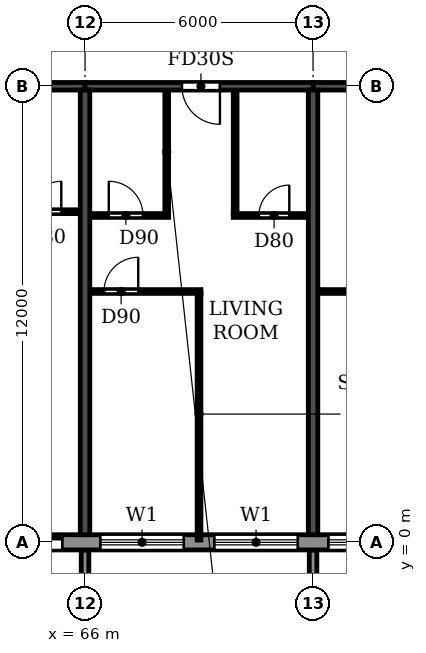
"""IFC4 building model, lengths in metres.
Left out: names, types, materials, properties, quantities, classifications, styles, units other than length and angle.
Written with IfcOpenShell. Run it as: python <this file> out.ifc"""

import sys

from ifc_helpers import new_model, si_unit, direction, frame, frame_2d, origin, place, context, subcontext, project, spatial, polyline, rectangle, outline, extrude, source, transform, mapped, element, fill, save


model = new_model("IFC4")
c1 = context("Model", 3, precision=1e-05, world=origin(), true_north=direction((0.0, 1.0)))
c2 = subcontext(c1, "Body", "Model", "MODEL_VIEW")
j1 = project(units=[si_unit("LENGTHUNIT", "METRE"), si_unit("PLANEANGLEUNIT", "RADIAN")], contexts=[c1])
p1 = place(None, origin())
s1 = spatial("IfcSite", under=j1, at=p1, CompositionType="ELEMENT")
p2 = place(p1, origin())
s2 = spatial("IfcBuilding", under=s1, at=p2, CompositionType="ELEMENT")
p3 = place(p2, frame((0.0, 0.0, 257.7)))
s3 = spatial("IfcBuildingStorey", under=s2, at=p3, CompositionType="ELEMENT", Elevation=257.7)
for number, where, z_axis, x_axis in (
    (1, (66.0, 0.2, 0.0), (0.0, 0.0, 1.0), (0.0, 1.0, 0.0)),
    (2, (72.0, 0.2, 0.0), (0.0, 0.0, 1.0), (0.0, 1.0, 0.0)),
):
    element("IfcWall", number, at=place(p3, frame(where, z_axis=z_axis, x_axis=x_axis)), inside=s3, PredefinedType="SHEAR", context=c2, shape_type="SweptSolid", body=[
        extrude(rectangle(XDim=11.7, YDim=0.25, at=frame_2d((5.85, 0.0))), origin(), (0.0, 0.0, 1.0), 3.0),
    ])
p4 = place(p3, frame((60.0, 12.0, 0.0), z_axis=(0.0, 0.0, 1.0), x_axis=(1.0, 0.0, 0.0)))
e3 = element("IfcWall", 3, at=p4, inside=s3, PredefinedType="SHEAR", context=c2, shape_type="SweptSolid", body=[
    extrude(rectangle(XDim=6.0, YDim=0.2, at=frame_2d((3.0, 0.0))), origin(), (0.0, 0.0, 1.0), 2.4),
])
p5 = place(p4, frame((2.55, 0.0, 0.0)))
e4 = element("IfcOpeningElement", 4, at=p5, cuts=e3, PredefinedType="OPENING", context=c2, shape_type="SweptSolid", body=[
    extrude(rectangle(XDim=1.0, YDim=2.1, at=frame_2d((0.5, 1.05))), frame((0.0, 0.11, 0.0), z_axis=(0.0, -1.0, 0.0), x_axis=(1.0, 0.0, 0.0)), (0.0, 0.0, 1.0), 0.22),
])
p6 = place(p3, frame((66.0, 12.0, 0.0), z_axis=(0.0, 0.0, 1.0), x_axis=(1.0, 0.0, 0.0)))
e5 = element("IfcWall", 5, at=p6, inside=s3, PredefinedType="SHEAR", context=c2, shape_type="SweptSolid", body=[
    extrude(rectangle(XDim=6.0, YDim=0.2, at=frame_2d((3.0, 0.0))), origin(), (0.0, 0.0, 1.0), 2.4),
])
p7 = place(p6, frame((2.55, 0.0, 0.0)))
e6 = element("IfcOpeningElement", 6, at=p7, cuts=e5, PredefinedType="OPENING", context=c2, shape_type="SweptSolid", body=[
    extrude(rectangle(XDim=1.0, YDim=2.1, at=frame_2d((0.5, 1.05))), frame((0.0, 0.11, 0.0), z_axis=(0.0, -1.0, 0.0), x_axis=(1.0, 0.0, 0.0)), (0.0, 0.0, 1.0), 0.22),
])
p8 = place(p3, frame((72.0, 12.0, 0.0), z_axis=(0.0, 0.0, 1.0), x_axis=(1.0, 0.0, 0.0)))
e7 = element("IfcWall", 7, at=p8, inside=s3, PredefinedType="SHEAR", context=c2, shape_type="SweptSolid", body=[
    extrude(rectangle(XDim=6.0, YDim=0.2, at=frame_2d((3.0, 0.0))), origin(), (0.0, 0.0, 1.0), 2.4),
])
p9 = place(p8, frame((2.45, 0.0, 0.0)))
e8 = element("IfcOpeningElement", 8, at=p9, cuts=e7, PredefinedType="OPENING", context=c2, shape_type="SweptSolid", body=[
    extrude(rectangle(XDim=1.0, YDim=2.1, at=frame_2d((0.5, 1.05))), frame((0.0, 0.11, 0.0), z_axis=(0.0, -1.0, 0.0), x_axis=(1.0, 0.0, 0.0)), (0.0, 0.0, 1.0), 0.22),
])
p10 = place(p3, frame((22.683, 0.0, 0.0), z_axis=(0.0, 0.0, 1.0), x_axis=(1.0, 0.0, 0.0)))
e9 = element("IfcWall", 9, at=p10, inside=s3, PredefinedType="STANDARD", context=c2, shape_type="SweptSolid", body=[
    extrude(rectangle(XDim=56.634, YDim=0.4, at=frame_2d((28.317, 0.0))), origin(), (0.0, 0.0, 1.0), 3.0),
])
p11 = place(p10, frame((1.717, 0.0, 0.9)))
e10 = element("IfcOpeningElement", 10, at=p11, cuts=e9, PredefinedType="OPENING", context=c2, shape_type="SweptSolid", body=[
    extrude(rectangle(XDim=2.2, YDim=1.5, at=frame_2d((1.1, 0.75))), frame((0.0, 0.21, 0.0), z_axis=(0.0, -1.0, 0.0), x_axis=(1.0, 0.0, 0.0)), (0.0, 0.0, 1.0), 0.42),
])
p12 = place(p10, frame((4.917, 0.0, 0.0)))
e11 = element("IfcOpeningElement", 11, at=p12, cuts=e9, PredefinedType="OPENING", context=c2, shape_type="SweptSolid", body=[
    extrude(rectangle(XDim=1.8, YDim=2.4, at=frame_2d((0.9, 1.2))), frame((0.0, 0.21, 0.0), z_axis=(0.0, -1.0, 0.0), x_axis=(1.0, 0.0, 0.0)), (0.0, 0.0, 1.0), 0.42),
])
p13 = place(p10, frame((7.717, 0.0, 0.9)))
e12 = element("IfcOpeningElement", 12, at=p13, cuts=e9, PredefinedType="OPENING", context=c2, shape_type="SweptSolid", body=[
    extrude(rectangle(XDim=2.2, YDim=1.5, at=frame_2d((1.1, 0.75))), frame((0.0, 0.21, 0.0), z_axis=(0.0, -1.0, 0.0), x_axis=(1.0, 0.0, 0.0)), (0.0, 0.0, 1.0), 0.42),
])
p14 = place(p10, frame((10.717, 0.0, 0.9)))
e13 = element("IfcOpeningElement", 13, at=p14, cuts=e9, PredefinedType="OPENING", context=c2, shape_type="SweptSolid", body=[
    extrude(rectangle(XDim=2.2, YDim=1.5, at=frame_2d((1.1, 0.75))), frame((0.0, 0.21, 0.0), z_axis=(0.0, -1.0, 0.0), x_axis=(1.0, 0.0, 0.0)), (0.0, 0.0, 1.0), 0.42),
])
p15 = place(p10, frame((13.717, 0.0, 0.9)))
e14 = element("IfcOpeningElement", 14, at=p15, cuts=e9, PredefinedType="OPENING", context=c2, shape_type="SweptSolid", body=[
    extrude(rectangle(XDim=2.2, YDim=1.5, at=frame_2d((1.1, 0.75))), frame((0.0, 0.21, 0.0), z_axis=(0.0, -1.0, 0.0), x_axis=(1.0, 0.0, 0.0)), (0.0, 0.0, 1.0), 0.42),
])
p16 = place(p10, frame((16.917, 0.0, 0.0)))
e15 = element("IfcOpeningElement", 15, at=p16, cuts=e9, PredefinedType="OPENING", context=c2, shape_type="SweptSolid", body=[
    extrude(rectangle(XDim=1.8, YDim=2.4, at=frame_2d((0.9, 1.2))), frame((0.0, 0.21, 0.0), z_axis=(0.0, -1.0, 0.0), x_axis=(1.0, 0.0, 0.0)), (0.0, 0.0, 1.0), 0.42),
])
p17 = place(p10, frame((19.717, 0.0, 0.9)))
e16 = element("IfcOpeningElement", 16, at=p17, cuts=e9, PredefinedType="OPENING", context=c2, shape_type="SweptSolid", body=[
    extrude(rectangle(XDim=2.2, YDim=1.5, at=frame_2d((1.1, 0.75))), frame((0.0, 0.21, 0.0), z_axis=(0.0, -1.0, 0.0), x_axis=(1.0, 0.0, 0.0)), (0.0, 0.0, 1.0), 0.42),
])
p18 = place(p10, frame((22.717, 0.0, 0.9)))
e17 = element("IfcOpeningElement", 17, at=p18, cuts=e9, PredefinedType="OPENING", context=c2, shape_type="SweptSolid", body=[
    extrude(rectangle(XDim=2.2, YDim=1.5, at=frame_2d((1.1, 0.75))), frame((0.0, 0.21, 0.0), z_axis=(0.0, -1.0, 0.0), x_axis=(1.0, 0.0, 0.0)), (0.0, 0.0, 1.0), 0.42),
])
p19 = place(p10, frame((25.717, 0.0, 0.9)))
e18 = element("IfcOpeningElement", 18, at=p19, cuts=e9, PredefinedType="OPENING", context=c2, shape_type="SweptSolid", body=[
    extrude(rectangle(XDim=2.2, YDim=1.5, at=frame_2d((1.1, 0.75))), frame((0.0, 0.21, 0.0), z_axis=(0.0, -1.0, 0.0), x_axis=(1.0, 0.0, 0.0)), (0.0, 0.0, 1.0), 0.42),
])
p20 = place(p10, frame((28.917, 0.0, 0.0)))
e19 = element("IfcOpeningElement", 19, at=p20, cuts=e9, PredefinedType="OPENING", context=c2, shape_type="SweptSolid", body=[
    extrude(rectangle(XDim=1.8, YDim=2.4, at=frame_2d((0.9, 1.2))), frame((0.0, 0.21, 0.0), z_axis=(0.0, -1.0, 0.0), x_axis=(1.0, 0.0, 0.0)), (0.0, 0.0, 1.0), 0.42),
])
p21 = place(p10, frame((31.717, 0.0, 0.9)))
e20 = element("IfcOpeningElement", 20, at=p21, cuts=e9, PredefinedType="OPENING", context=c2, shape_type="SweptSolid", body=[
    extrude(rectangle(XDim=2.2, YDim=1.5, at=frame_2d((1.1, 0.75))), frame((0.0, 0.21, 0.0), z_axis=(0.0, -1.0, 0.0), x_axis=(1.0, 0.0, 0.0)), (0.0, 0.0, 1.0), 0.42),
])
p22 = place(p10, frame((34.717, 0.0, 0.9)))
e21 = element("IfcOpeningElement", 21, at=p22, cuts=e9, PredefinedType="OPENING", context=c2, shape_type="SweptSolid", body=[
    extrude(rectangle(XDim=2.2, YDim=1.5, at=frame_2d((1.1, 0.75))), frame((0.0, 0.21, 0.0), z_axis=(0.0, -1.0, 0.0), x_axis=(1.0, 0.0, 0.0)), (0.0, 0.0, 1.0), 0.42),
])
p23 = place(p10, frame((37.717, 0.0, 0.9)))
e22 = element("IfcOpeningElement", 22, at=p23, cuts=e9, PredefinedType="OPENING", context=c2, shape_type="SweptSolid", body=[
    extrude(rectangle(XDim=2.2, YDim=1.5, at=frame_2d((1.1, 0.75))), frame((0.0, 0.21, 0.0), z_axis=(0.0, -1.0, 0.0), x_axis=(1.0, 0.0, 0.0)), (0.0, 0.0, 1.0), 0.42),
])
p24 = place(p10, frame((40.917, 0.0, 0.0)))
e23 = element("IfcOpeningElement", 23, at=p24, cuts=e9, PredefinedType="OPENING", context=c2, shape_type="SweptSolid", body=[
    extrude(rectangle(XDim=1.8, YDim=2.4, at=frame_2d((0.9, 1.2))), frame((0.0, 0.21, 0.0), z_axis=(0.0, -1.0, 0.0), x_axis=(1.0, 0.0, 0.0)), (0.0, 0.0, 1.0), 0.42),
])
p25 = place(p10, frame((43.717, 0.0, 0.9)))
e24 = element("IfcOpeningElement", 24, at=p25, cuts=e9, PredefinedType="OPENING", context=c2, shape_type="SweptSolid", body=[
    extrude(rectangle(XDim=2.2, YDim=1.5, at=frame_2d((1.1, 0.75))), frame((0.0, 0.21, 0.0), z_axis=(0.0, -1.0, 0.0), x_axis=(1.0, 0.0, 0.0)), (0.0, 0.0, 1.0), 0.42),
])
p26 = place(p10, frame((46.717, 0.0, 0.9)))
e25 = element("IfcOpeningElement", 25, at=p26, cuts=e9, PredefinedType="OPENING", context=c2, shape_type="SweptSolid", body=[
    extrude(rectangle(XDim=2.2, YDim=1.5, at=frame_2d((1.1, 0.75))), frame((0.0, 0.21, 0.0), z_axis=(0.0, -1.0, 0.0), x_axis=(1.0, 0.0, 0.0)), (0.0, 0.0, 1.0), 0.42),
])
p27 = place(p10, frame((49.717, 0.0, 0.9)))
e26 = element("IfcOpeningElement", 26, at=p27, cuts=e9, PredefinedType="OPENING", context=c2, shape_type="SweptSolid", body=[
    extrude(rectangle(XDim=2.2, YDim=1.5, at=frame_2d((1.1, 0.75))), frame((0.0, 0.21, 0.0), z_axis=(0.0, -1.0, 0.0), x_axis=(1.0, 0.0, 0.0)), (0.0, 0.0, 1.0), 0.42),
])
p28 = place(p10, frame((52.917, 0.0, 0.0)))
e27 = element("IfcOpeningElement", 27, at=p28, cuts=e9, PredefinedType="OPENING", context=c2, shape_type="SweptSolid", body=[
    extrude(rectangle(XDim=1.8, YDim=2.4, at=frame_2d((0.9, 1.2))), frame((0.0, 0.21, 0.0), z_axis=(0.0, -1.0, 0.0), x_axis=(1.0, 0.0, 0.0)), (0.0, 0.0, 1.0), 0.42),
])
m1 = source(origin(), c2, "Body", "SweptSolid", [
    extrude(outline(polyline([(0.0, 0.0), (0.2, 0.0), (0.2, 1.65), (0.0, 1.65), (0.0, 0.0)])), origin(), (0.0, 0.0, 1.0), 3.1),
])
for number, where in (
    (28, (65.9, -1.85, 0.0)),
    (29, (71.9, -1.85, 0.0)),
):
    element("IfcWall", number, at=place(p3, frame(where)), inside=s3, PredefinedType="STANDARD", context=c2, shape_type="MappedRepresentation", body=[
        mapped(m1, transform((0.0, 0.0, 0.0))),
    ])
p29 = place(p3, frame((66.135, 6.6, 0.0), z_axis=(0.0, 0.0, 1.0), x_axis=(1.0, 0.0, 0.0)))
e30 = element("IfcWall", 30, at=p29, inside=s3, PredefinedType="PARTITIONING", context=c2, shape_type="SweptSolid", body=[
    extrude(rectangle(XDim=2.915, YDim=0.1, at=frame_2d((1.458, 0.0))), origin(), (0.0, 0.0, 1.0), 3.0),
])
p30 = place(p29, frame((0.365, 0.0, 0.0)))
e31 = element("IfcOpeningElement", 31, at=p30, cuts=e30, PredefinedType="OPENING", context=c2, shape_type="SweptSolid", body=[
    extrude(rectangle(XDim=0.9, YDim=2.1, at=frame_2d((0.45, 1.05))), frame((0.0, 0.06, 0.0), z_axis=(0.0, -1.0, 0.0), x_axis=(1.0, 0.0, 0.0)), (0.0, 0.0, 1.0), 0.12),
])
p31 = place(p3, frame((72.135, 6.6, 0.0), z_axis=(0.0, 0.0, 1.0), x_axis=(1.0, 0.0, 0.0)))
e32 = element("IfcWall", 32, at=p31, inside=s3, PredefinedType="PARTITIONING", context=c2, shape_type="SweptSolid", body=[
    extrude(rectangle(XDim=1.965, YDim=0.1, at=frame_2d((0.982, 0.0))), origin(), (0.0, 0.0, 1.0), 3.0),
])
p32 = place(p3, frame((66.135, 8.6, 0.0), z_axis=(0.0, 0.0, 1.0), x_axis=(1.0, 0.0, 0.0)))
e33 = element("IfcWall", 33, at=p32, inside=s3, PredefinedType="PARTITIONING", context=c2, shape_type="SweptSolid", body=[
    extrude(rectangle(XDim=2.065, YDim=0.1, at=frame_2d((1.032, 0.0))), origin(), (0.0, 0.0, 1.0), 3.0),
])
p33 = place(p32, frame((0.49, 0.0, 0.0)))
e34 = element("IfcOpeningElement", 34, at=p33, cuts=e33, PredefinedType="OPENING", context=c2, shape_type="SweptSolid", body=[
    extrude(rectangle(XDim=0.9, YDim=2.1, at=frame_2d((0.45, 1.05))), frame((0.0, 0.06, 0.0), z_axis=(0.0, -1.0, 0.0), x_axis=(1.0, 0.0, 0.0)), (0.0, 0.0, 1.0), 0.12),
])
p34 = place(p3, frame((69.9, 8.6, 0.0), z_axis=(0.0, 0.0, 1.0), x_axis=(1.0, 0.0, 0.0)))
e35 = element("IfcWall", 35, at=p34, inside=s3, PredefinedType="PARTITIONING", context=c2, shape_type="SweptSolid", body=[
    extrude(rectangle(XDim=1.965, YDim=0.1, at=frame_2d((0.982, 0.0))), origin(), (0.0, 0.0, 1.0), 3.0),
])
p35 = place(p34, frame((0.675, 0.0, 0.0)))
e36 = element("IfcOpeningElement", 36, at=p35, cuts=e35, PredefinedType="OPENING", context=c2, shape_type="SweptSolid", body=[
    extrude(rectangle(XDim=0.8, YDim=2.1, at=frame_2d((0.4, 1.05))), frame((0.0, 0.06, 0.0), z_axis=(0.0, -1.0, 0.0), x_axis=(1.0, 0.0, 0.0)), (0.0, 0.0, 1.0), 0.12),
])
p36 = place(p3, frame((63.9, 8.7, 0.0), z_axis=(0.0, 0.0, 1.0), x_axis=(1.0, 0.0, 0.0)))
e37 = element("IfcWall", 37, at=p36, inside=s3, PredefinedType="PARTITIONING", context=c2, shape_type="SweptSolid", body=[
    extrude(rectangle(XDim=1.965, YDim=0.1, at=frame_2d((0.982, 0.0))), origin(), (0.0, 0.0, 1.0), 3.0),
])
p37 = place(p36, frame((0.675, 0.0, 0.0)))
e38 = element("IfcOpeningElement", 38, at=p37, cuts=e37, PredefinedType="OPENING", context=c2, shape_type="SweptSolid", body=[
    extrude(rectangle(XDim=0.8, YDim=2.1, at=frame_2d((0.4, 1.05))), frame((0.0, 0.06, 0.0), z_axis=(0.0, -1.0, 0.0), x_axis=(1.0, 0.0, 0.0)), (0.0, 0.0, 1.0), 0.12),
])
p38 = place(p3, frame((68.15, 8.65, 0.0), z_axis=(0.0, 0.0, 1.0), x_axis=(0.0, 1.0, 0.0)))
e39 = element("IfcWall", 39, at=p38, inside=s3, PredefinedType="PARTITIONING", context=c2, shape_type="SweptSolid", body=[
    extrude(rectangle(XDim=3.24, YDim=0.1, at=frame_2d((1.62, 0.0))), origin(), (0.0, 0.0, 1.0), 3.0),
])
p39 = place(p3, frame((69.0, 0.06, 0.0), z_axis=(0.0, 0.0, 1.0), x_axis=(0.0, 1.0, 0.0)))
e40 = element("IfcWall", 40, at=p39, inside=s3, PredefinedType="PARTITIONING", context=c2, shape_type="SweptSolid", body=[
    extrude(rectangle(XDim=6.49, YDim=0.1, at=frame_2d((3.245, 0.0))), origin(), (0.0, 0.0, 1.0), 3.0),
])
p40 = place(p3, frame((69.95, 8.65, 0.0), z_axis=(0.0, 0.0, 1.0), x_axis=(0.0, 1.0, 0.0)))
e41 = element("IfcWall", 41, at=p40, inside=s3, PredefinedType="PARTITIONING", context=c2, shape_type="SweptSolid", body=[
    extrude(rectangle(XDim=3.24, YDim=0.1, at=frame_2d((1.62, 0.0))), origin(), (0.0, 0.0, 1.0), 3.0),
])
p41 = place(p24, origin())
e42 = element("IfcDoor", 42, at=p41, inside=s3, OperationType="DOUBLE_DOOR_SLIDING", PredefinedType="DOOR", context=c2, shape_type="SweptSolid", body=[
    extrude(rectangle(XDim=1.8, YDim=2.4, at=frame_2d((0.9, 1.2))), frame((0.0, 0.025, 0.0), z_axis=(0.0, -1.0, 0.0), x_axis=(1.0, 0.0, 0.0)), (0.0, 0.0, 1.0), 0.05),
])
fill(e23, e42)
p42 = place(p25, origin())
e43 = element("IfcWindow", 43, at=p42, inside=s3, PartitioningType="DOUBLE_PANEL_HORIZONTAL", PredefinedType="WINDOW", context=c2, shape_type="SweptSolid", body=[
    extrude(rectangle(XDim=2.2, YDim=1.5, at=frame_2d((1.1, 0.75))), frame((0.0, 0.03, 0.0), z_axis=(0.0, -1.0, 0.0), x_axis=(1.0, 0.0, 0.0)), (0.0, 0.0, 1.0), 0.06),
])
fill(e24, e43)
p43 = place(p26, origin())
e44 = element("IfcWindow", 44, at=p43, inside=s3, PartitioningType="DOUBLE_PANEL_HORIZONTAL", PredefinedType="WINDOW", context=c2, shape_type="SweptSolid", body=[
    extrude(rectangle(XDim=2.2, YDim=1.5, at=frame_2d((1.1, 0.75))), frame((0.0, 0.03, 0.0), z_axis=(0.0, -1.0, 0.0), x_axis=(1.0, 0.0, 0.0)), (0.0, 0.0, 1.0), 0.06),
])
fill(e25, e44)
p44 = place(p27, origin())
e45 = element("IfcWindow", 45, at=p44, inside=s3, PartitioningType="DOUBLE_PANEL_HORIZONTAL", PredefinedType="WINDOW", context=c2, shape_type="SweptSolid", body=[
    extrude(rectangle(XDim=2.2, YDim=1.5, at=frame_2d((1.1, 0.75))), frame((0.0, 0.03, 0.0), z_axis=(0.0, -1.0, 0.0), x_axis=(1.0, 0.0, 0.0)), (0.0, 0.0, 1.0), 0.06),
])
fill(e26, e45)
p45 = place(p37, origin())
e46 = element("IfcDoor", 46, at=p45, inside=s3, OperationType="SINGLE_SWING_RIGHT", PredefinedType="DOOR", context=c2, shape_type="SweptSolid", body=[
    extrude(rectangle(XDim=0.8, YDim=2.1, at=frame_2d((0.4, 1.05))), frame((0.0, 0.025, 0.0), z_axis=(0.0, -1.0, 0.0), x_axis=(1.0, 0.0, 0.0)), (0.0, 0.0, 1.0), 0.05),
])
fill(e38, e46)
p46 = place(p30, origin())
e47 = element("IfcDoor", 47, at=p46, inside=s3, OperationType="SINGLE_SWING_RIGHT", PredefinedType="DOOR", context=c2, shape_type="SweptSolid", body=[
    extrude(rectangle(XDim=0.9, YDim=2.1, at=frame_2d((0.45, 1.05))), frame((0.0, 0.025, 0.0), z_axis=(0.0, -1.0, 0.0), x_axis=(1.0, 0.0, 0.0)), (0.0, 0.0, 1.0), 0.05),
])
fill(e31, e47)
p47 = place(p33, origin())
e48 = element("IfcDoor", 48, at=p47, inside=s3, OperationType="SINGLE_SWING_LEFT", PredefinedType="DOOR", context=c2, shape_type="SweptSolid", body=[
    extrude(rectangle(XDim=0.9, YDim=2.1, at=frame_2d((0.45, 1.05))), frame((0.0, 0.025, 0.0), z_axis=(0.0, -1.0, 0.0), x_axis=(1.0, 0.0, 0.0)), (0.0, 0.0, 1.0), 0.05),
])
fill(e34, e48)
p48 = place(p7, frame((1.0, 0.0, 0.0), z_axis=(0.0, 0.0, 1.0), x_axis=(-1.0, 0.0, 0.0)))
e49 = element("IfcDoor", 49, at=p48, inside=s3, OperationType="SINGLE_SWING_LEFT", PredefinedType="DOOR", context=c2, shape_type="SweptSolid", body=[
    extrude(rectangle(XDim=1.0, YDim=2.1, at=frame_2d((0.5, 1.05))), frame((0.0, 0.025, 0.0), z_axis=(0.0, -1.0, 0.0), x_axis=(1.0, 0.0, 0.0)), (0.0, 0.0, 1.0), 0.05),
])
fill(e6, e49)
p49 = place(p35, origin())
e50 = element("IfcDoor", 50, at=p49, inside=s3, OperationType="SINGLE_SWING_RIGHT", PredefinedType="DOOR", context=c2, shape_type="SweptSolid", body=[
    extrude(rectangle(XDim=0.8, YDim=2.1, at=frame_2d((0.4, 1.05))), frame((0.0, 0.025, 0.0), z_axis=(0.0, -1.0, 0.0), x_axis=(1.0, 0.0, 0.0)), (0.0, 0.0, 1.0), 0.05),
])
fill(e36, e50)
save(model, sys.argv[1])
